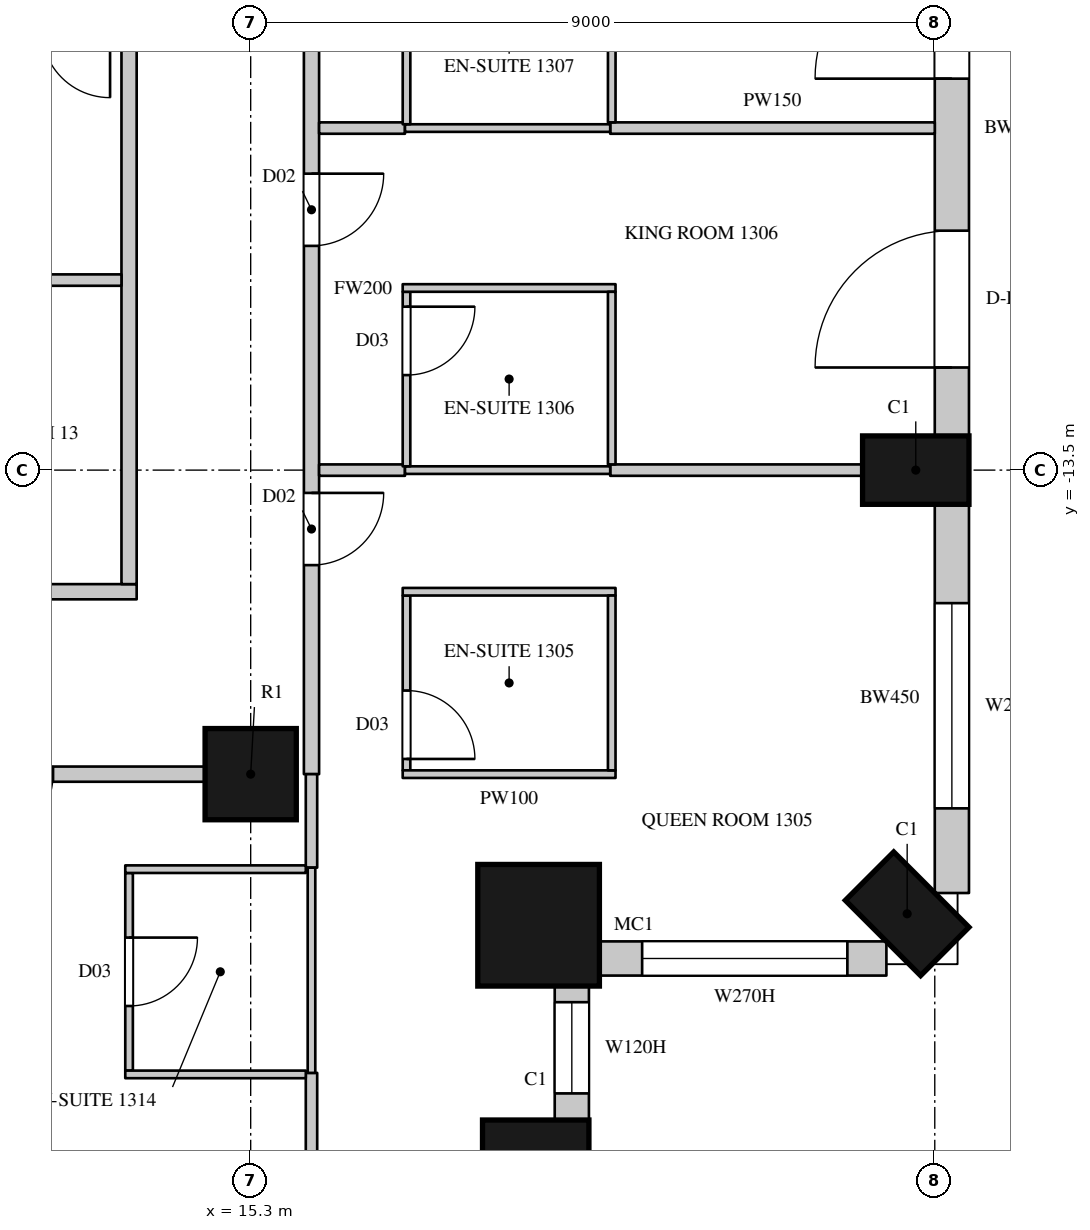
"""IFC4 building model, lengths in metres.
Left out: names, types, materials, properties, quantities, classifications, styles, units other than length and angle.
Written with IfcOpenShell. Run it as: python <this file> out.ifc"""

import sys

from ifc_helpers import new_model, si_unit, direction, frame, frame_2d, origin, origin_2d, place, context, subcontext, project, spatial, rectangle, circle, extrude, element, fill, save


model = new_model("IFC4")
c1 = context("Model", 3, precision=1e-05, world=origin(), true_north=direction((0.0, 1.0)))
c2 = subcontext(c1, "Body", "Model", "MODEL_VIEW")
j1 = project(units=[si_unit("LENGTHUNIT", "METRE"), si_unit("PLANEANGLEUNIT", "RADIAN")], contexts=[c1])
p1 = place(None, origin())
s1 = spatial("IfcSite", under=j1, at=p1, CompositionType="ELEMENT")
p2 = place(p1, origin())
s2 = spatial("IfcBuilding", under=s1, at=p2, CompositionType="ELEMENT")
p3 = place(p2, frame((0.0, 0.0, 77.1)))
s3 = spatial("IfcBuildingStorey", under=s2, at=p3, CompositionType="ELEMENT", Elevation=77.1)
p4 = place(p3, frame((19.05, -22.5, 0.0), z_axis=(0.0, 0.0, 1.0), x_axis=(0.0, 1.0, 0.0)))
e1 = element("IfcColumn", 1, at=p4, inside=s3, PredefinedType="COLUMN", context=c2, shape_type="SweptSolid", body=[
    extrude(rectangle(XDim=0.9, YDim=1.4, at=origin_2d()), origin(), (0.0, 0.0, 1.0), 3.6),
])
p5 = place(p3, frame((19.088, -19.488, 0.0), z_axis=(0.0, 0.0, 1.0), x_axis=(1.0, 0.0, 0.0)))
e2 = element("IfcColumn", 2, at=p5, inside=s3, PredefinedType="COLUMN", context=c2, shape_type="SweptSolid", body=[
    extrude(circle(Radius=0.8, at=origin_2d()), origin(), (0.0, 0.0, 1.0), 3.6),
])
for number, where, z_axis, x_axis in (
    (3, (23.937, -19.337, 0.0), (0.0, 0.0, 1.0), (0.707, 0.707, 0.0)),
    (4, (24.05, -13.5, 0.0), (0.0, 0.0, 1.0), (0.0, 1.0, 0.0)),
):
    element("IfcColumn", number, at=place(p3, frame(where, z_axis=z_axis, x_axis=x_axis)), inside=s3, PredefinedType="COLUMN", context=c2, shape_type="SweptSolid", body=[
        extrude(rectangle(XDim=0.9, YDim=1.4, at=origin_2d()), origin(), (0.0, 0.0, 1.0), 3.6),
    ])
p6 = place(p3, frame((15.3, -17.5, 0.0), z_axis=(0.0, 0.0, 1.0), x_axis=(1.0, 0.0, 0.0)))
e5 = element("IfcColumn", 5, at=p6, inside=s3, PredefinedType="COLUMN", context=c2, shape_type="SweptSolid", body=[
    extrude(circle(Radius=0.6, at=origin_2d()), origin(), (0.0, 0.0, 1.0), 3.6),
])
p7 = place(p3, frame((19.525, -22.05, 0.0), z_axis=(0.0, 0.0, 1.0), x_axis=(0.0, 1.0, 0.0)))
e6 = element("IfcWall", 6, at=p7, inside=s3, PredefinedType="SOLIDWALL", context=c2, shape_type="SweptSolid", body=[
    extrude(rectangle(XDim=1.792, YDim=0.45, at=frame_2d((0.896, 0.0))), origin(), (0.0, 0.0, 1.0), 3.3),
])
p8 = place(p7, frame((0.35, 0.0, 1.05)))
e7 = element("IfcOpeningElement", 7, at=p8, cuts=e6, PredefinedType="OPENING", context=c2, shape_type="SweptSolid", body=[
    extrude(rectangle(XDim=1.2, YDim=2.0, at=frame_2d((0.6, 1.0))), frame((0.0, 0.235, 0.0), z_axis=(0.0, -1.0, 0.0), x_axis=(1.0, 0.0, 0.0)), (0.0, 0.0, 1.0), 0.47),
])
p9 = place(p3, frame((19.858, -19.925, 0.0), z_axis=(0.0, 0.0, 1.0), x_axis=(1.0, 0.0, 0.0)))
e8 = element("IfcWall", 8, at=p9, inside=s3, PredefinedType="SOLIDWALL", context=c2, shape_type="SweptSolid", body=[
    extrude(rectangle(XDim=3.805, YDim=0.45, at=frame_2d((1.903, 0.0))), origin(), (0.0, 0.0, 1.0), 3.3),
])
p10 = place(p9, frame((0.592, 0.0, 1.05)))
e9 = element("IfcOpeningElement", 9, at=p10, cuts=e8, PredefinedType="OPENING", context=c2, shape_type="SweptSolid", body=[
    extrude(rectangle(XDim=2.7, YDim=2.0, at=frame_2d((1.35, 1.0))), frame((0.0, 0.235, 0.0), z_axis=(0.0, -1.0, 0.0), x_axis=(1.0, 0.0, 0.0)), (0.0, 0.0, 1.0), 0.47),
])
p11 = place(p3, frame((24.525, -19.064, 0.0), z_axis=(0.0, 0.0, 1.0), x_axis=(0.0, 1.0, 0.0)))
e10 = element("IfcWall", 10, at=p11, inside=s3, PredefinedType="SOLIDWALL", context=c2, shape_type="SweptSolid", body=[
    extrude(rectangle(XDim=5.114, YDim=0.45, at=frame_2d((2.557, 0.0))), origin(), (0.0, 0.0, 1.0), 3.3),
])
p12 = place(p11, frame((1.114, 0.0, 1.05)))
e11 = element("IfcOpeningElement", 11, at=p12, cuts=e10, PredefinedType="OPENING", context=c2, shape_type="SweptSolid", body=[
    extrude(rectangle(XDim=2.7, YDim=2.0, at=frame_2d((1.35, 1.0))), frame((0.0, 0.235, 0.0), z_axis=(0.0, -1.0, 0.0), x_axis=(1.0, 0.0, 0.0)), (0.0, 0.0, 1.0), 0.47),
])
p13 = place(p3, frame((24.525, -13.05, 0.0), z_axis=(0.0, 0.0, 1.0), x_axis=(0.0, 1.0, 0.0)))
e12 = element("IfcWall", 12, at=p13, inside=s3, PredefinedType="SOLIDWALL", context=c2, shape_type="SweptSolid", body=[
    extrude(rectangle(XDim=8.1, YDim=0.45, at=frame_2d((4.05, 0.0))), origin(), (0.0, 0.0, 1.0), 3.3),
])
p14 = place(p13, frame((0.9, 0.0, 0.0)))
e13 = element("IfcOpeningElement", 13, at=p14, cuts=e12, PredefinedType="OPENING", context=c2, shape_type="SweptSolid", body=[
    extrude(rectangle(XDim=1.8, YDim=2.4, at=frame_2d((0.9, 1.2))), frame((0.0, 0.235, 0.0), z_axis=(0.0, -1.0, 0.0), x_axis=(1.0, 0.0, 0.0)), (0.0, 0.0, 1.0), 0.47),
])
p15 = place(p13, frame((4.7, 0.0, 0.0)))
e14 = element("IfcOpeningElement", 14, at=p15, cuts=e12, PredefinedType="OPENING", context=c2, shape_type="SweptSolid", body=[
    extrude(rectangle(XDim=1.8, YDim=2.4, at=frame_2d((0.9, 1.2))), frame((0.0, 0.235, 0.0), z_axis=(0.0, -1.0, 0.0), x_axis=(1.0, 0.0, 0.0)), (0.0, 0.0, 1.0), 0.47),
])
p16 = place(p13, frame((6.7, 0.0, 1.05)))
e15 = element("IfcOpeningElement", 15, at=p16, cuts=e12, PredefinedType="OPENING", context=c2, shape_type="SweptSolid", body=[
    extrude(rectangle(XDim=1.2, YDim=2.0, at=frame_2d((0.6, 1.0))), frame((0.0, 0.235, 0.0), z_axis=(0.0, -1.0, 0.0), x_axis=(1.0, 0.0, 0.0)), (0.0, 0.0, 1.0), 0.47),
])
p17 = place(p3, frame((6.9, -17.5, 0.0), z_axis=(0.0, 0.0, 1.0), x_axis=(1.0, 0.0, 0.0)))
e16 = element("IfcWall", 16, at=p17, inside=s3, PredefinedType="PARTITIONING", context=c2, shape_type="SweptSolid", body=[
    extrude(rectangle(XDim=7.8, YDim=0.2, at=frame_2d((3.9, 0.0))), origin(), (0.0, 0.0, 1.0), 2.75),
])
p18 = place(p17, frame((4.85, 0.0, 0.0)))
e17 = element("IfcOpeningElement", 17, at=p18, cuts=e16, PredefinedType="OPENING", context=c2, shape_type="SweptSolid", body=[
    extrude(rectangle(XDim=0.95, YDim=2.2, at=frame_2d((0.475, 1.1))), frame((0.0, 0.11, 0.0), z_axis=(0.0, -1.0, 0.0), x_axis=(1.0, 0.0, 0.0)), (0.0, 0.0, 1.0), 0.22),
])
p19 = place(p3, frame((-4.5, -15.1, 0.0), z_axis=(0.0, 0.0, 1.0), x_axis=(1.0, 0.0, 0.0)))
e18 = element("IfcWall", 18, at=p19, inside=s3, PredefinedType="PARTITIONING", context=c2, shape_type="SweptSolid", body=[
    extrude(rectangle(XDim=18.3, YDim=0.2, at=frame_2d((9.15, 0.0))), origin(), (0.0, 0.0, 1.0), 3.3),
])
p20 = place(p19, frame((10.05, 0.0, 0.0)))
e19 = element("IfcOpeningElement", 19, at=p20, cuts=e18, PredefinedType="OPENING", context=c2, shape_type="SweptSolid", body=[
    extrude(rectangle(XDim=0.9, YDim=2.2, at=frame_2d((0.45, 1.1))), frame((0.0, 0.11, 0.0), z_axis=(0.0, -1.0, 0.0), x_axis=(1.0, 0.0, 0.0)), (0.0, 0.0, 1.0), 0.22),
])
p21 = place(p3, frame((13.7, -15.0, 0.0), z_axis=(0.0, 0.0, 1.0), x_axis=(0.0, 1.0, 0.0)))
e20 = element("IfcWall", 20, at=p21, inside=s3, PredefinedType="PARTITIONING", context=c2, shape_type="SweptSolid", body=[
    extrude(rectangle(XDim=7.2, YDim=0.2, at=frame_2d((3.6, 0.0))), origin(), (0.0, 0.0, 1.0), 3.3),
])
p22 = place(p3, frame((16.1, -17.5, 0.0), z_axis=(0.0, 0.0, 1.0), x_axis=(0.0, 1.0, 0.0)))
e21 = element("IfcWall", 21, at=p22, inside=s3, PredefinedType="PARTITIONING", context=c2, shape_type="SweptSolid", body=[
    extrude(rectangle(XDim=12.75, YDim=0.2, at=frame_2d((6.375, 0.0))), origin(), (0.0, 0.0, 1.0), 3.3),
])
p23 = place(p22, frame((2.75, 0.0, 0.0)))
e22 = element("IfcOpeningElement", 22, at=p23, cuts=e21, PredefinedType="OPENING", context=c2, shape_type="SweptSolid", body=[
    extrude(rectangle(XDim=0.95, YDim=2.2, at=frame_2d((0.475, 1.1))), frame((0.0, 0.11, 0.0), z_axis=(0.0, -1.0, 0.0), x_axis=(1.0, 0.0, 0.0)), (0.0, 0.0, 1.0), 0.22),
])
p24 = place(p22, frame((6.95, 0.0, 0.0)))
e23 = element("IfcOpeningElement", 23, at=p24, cuts=e21, PredefinedType="OPENING", context=c2, shape_type="SweptSolid", body=[
    extrude(rectangle(XDim=0.95, YDim=2.2, at=frame_2d((0.475, 1.1))), frame((0.0, 0.11, 0.0), z_axis=(0.0, -1.0, 0.0), x_axis=(1.0, 0.0, 0.0)), (0.0, 0.0, 1.0), 0.22),
])
p25 = place(p22, frame((11.4, 0.0, 0.0)))
e24 = element("IfcOpeningElement", 24, at=p25, cuts=e21, PredefinedType="OPENING", context=c2, shape_type="SweptSolid", body=[
    extrude(rectangle(XDim=0.95, YDim=2.2, at=frame_2d((0.475, 1.1))), frame((0.0, 0.11, 0.0), z_axis=(0.0, -1.0, 0.0), x_axis=(1.0, 0.0, 0.0)), (0.0, 0.0, 1.0), 0.22),
])
p26 = place(p3, frame((10.0, -11.0, 0.0), z_axis=(0.0, 0.0, 1.0), x_axis=(1.0, 0.0, 0.0)))
e25 = element("IfcWall", 25, at=p26, inside=s3, PredefinedType="PARTITIONING", context=c2, shape_type="SweptSolid", body=[
    extrude(rectangle(XDim=3.6, YDim=0.15, at=frame_2d((1.8, 0.0))), origin(), (0.0, 0.0, 1.0), 3.3),
])
p27 = place(p3, frame((16.1, -25.7, 0.0), z_axis=(0.0, 0.0, 1.0), x_axis=(0.0, 1.0, 0.0)))
e26 = element("IfcWall", 26, at=p27, inside=s3, PredefinedType="PARTITIONING", context=c2, shape_type="SweptSolid", body=[
    extrude(rectangle(XDim=4.27, YDim=0.15, at=frame_2d((2.135, 0.0))), origin(), (0.0, 0.0, 1.0), 3.3),
])
p28 = place(p3, frame((16.1, -18.73, 0.0), z_axis=(0.0, 0.0, 1.0), x_axis=(0.0, 1.0, 0.0)))
e27 = element("IfcWall", 27, at=p28, inside=s3, PredefinedType="PARTITIONING", context=c2, shape_type="SweptSolid", body=[
    extrude(rectangle(XDim=1.23, YDim=0.15, at=frame_2d((0.615, 0.0))), origin(), (0.0, 0.0, 1.0), 3.3),
])
p29 = place(p3, frame((16.2, -13.5, 0.0), z_axis=(0.0, 0.0, 1.0), x_axis=(1.0, 0.0, 0.0)))
e28 = element("IfcWall", 28, at=p29, inside=s3, PredefinedType="PARTITIONING", context=c2, shape_type="SweptSolid", body=[
    extrude(rectangle(XDim=1.13, YDim=0.15, at=frame_2d((0.565, 0.0))), origin(), (0.0, 0.0, 1.0), 3.3),
])
p30 = place(p3, frame((16.2, -9.0, 0.0), z_axis=(0.0, 0.0, 1.0), x_axis=(1.0, 0.0, 0.0)))
e29 = element("IfcWall", 29, at=p30, inside=s3, PredefinedType="PARTITIONING", context=c2, shape_type="SweptSolid", body=[
    extrude(rectangle(XDim=1.13, YDim=0.15, at=frame_2d((0.565, 0.0))), origin(), (0.0, 0.0, 1.0), 2.65),
])
p31 = place(p3, frame((20.03, -13.5, 0.0), z_axis=(0.0, 0.0, 1.0), x_axis=(1.0, 0.0, 0.0)))
e30 = element("IfcWall", 30, at=p31, inside=s3, PredefinedType="PARTITIONING", context=c2, shape_type="SweptSolid", body=[
    extrude(rectangle(XDim=3.32, YDim=0.15, at=frame_2d((1.66, 0.0))), origin(), (0.0, 0.0, 1.0), 3.3),
])
p32 = place(p3, frame((20.03, -9.0, 0.0), z_axis=(0.0, 0.0, 1.0), x_axis=(1.0, 0.0, 0.0)))
e31 = element("IfcWall", 31, at=p32, inside=s3, PredefinedType="PARTITIONING", context=c2, shape_type="SweptSolid", body=[
    extrude(rectangle(XDim=4.27, YDim=0.15, at=frame_2d((2.135, 0.0))), origin(), (0.0, 0.0, 1.0), 2.65),
])
p33 = place(p3, frame((13.7, -21.4, 0.0), z_axis=(0.0, 0.0, 1.0), x_axis=(0.0, 1.0, 0.0)))
e32 = element("IfcWall", 32, at=p33, inside=s3, PredefinedType="PARTITIONING", context=c2, shape_type="SweptSolid", body=[
    extrude(rectangle(XDim=2.6, YDim=0.1, at=frame_2d((1.3, 0.0))), origin(), (0.0, 0.0, 1.0), 3.3),
])
p34 = place(p33, frame((0.85, 0.0, 0.0)))
e33 = element("IfcOpeningElement", 33, at=p34, cuts=e32, PredefinedType="OPENING", context=c2, shape_type="SweptSolid", body=[
    extrude(rectangle(XDim=0.9, YDim=2.2, at=frame_2d((0.45, 1.1))), frame((0.0, 0.06, 0.0), z_axis=(0.0, -1.0, 0.0), x_axis=(1.0, 0.0, 0.0)), (0.0, 0.0, 1.0), 0.12),
])
for number, where, z_axis, x_axis in (
    (34, (13.65, -21.45, 0.0), (0.0, 0.0, 1.0), (1.0, 0.0, 0.0)),
    (35, (13.65, -18.75, 0.0), (0.0, 0.0, 1.0), (1.0, 0.0, 0.0)),
):
    element("IfcWall", number, at=place(p3, frame(where, z_axis=z_axis, x_axis=x_axis)), inside=s3, PredefinedType="PARTITIONING", context=c2, shape_type="SweptSolid", body=[
        extrude(rectangle(XDim=2.375, YDim=0.1, at=frame_2d((1.188, 0.0))), origin(), (0.0, 0.0, 1.0), 3.3),
    ])
for number, where, z_axis, x_axis in (
    (36, (16.1, -21.43, 0.0), (0.0, 0.0, 1.0), (0.0, 1.0, 0.0)),
    (37, (17.33, -13.5, 0.0), (0.0, 0.0, 1.0), (1.0, 0.0, 0.0)),
):
    element("IfcWall", number, at=place(p3, frame(where, z_axis=z_axis, x_axis=x_axis)), inside=s3, PredefinedType="PARTITIONING", context=c2, shape_type="SweptSolid", body=[
        extrude(rectangle(XDim=2.7, YDim=0.1, at=frame_2d((1.35, 0.0))), origin(), (0.0, 0.0, 1.0), 3.3),
    ])
p35 = place(p3, frame((17.33, -9.0, 0.0), z_axis=(0.0, 0.0, 1.0), x_axis=(1.0, 0.0, 0.0)))
e38 = element("IfcWall", 38, at=p35, inside=s3, PredefinedType="PARTITIONING", context=c2, shape_type="SweptSolid", body=[
    extrude(rectangle(XDim=2.7, YDim=0.1, at=frame_2d((1.35, 0.0))), origin(), (0.0, 0.0, 1.0), 2.65),
])
p36 = place(p3, frame((17.35, -17.45, 0.0), z_axis=(0.0, 0.0, 1.0), x_axis=(0.0, 1.0, 0.0)))
e39 = element("IfcWall", 39, at=p36, inside=s3, PredefinedType="PARTITIONING", context=c2, shape_type="SweptSolid", body=[
    extrude(rectangle(XDim=2.3, YDim=0.1, at=frame_2d((1.15, 0.0))), origin(), (0.0, 0.0, 1.0), 3.3),
])
p37 = place(p36, frame((0.15, 0.0, 0.0)))
e40 = element("IfcOpeningElement", 40, at=p37, cuts=e39, PredefinedType="OPENING", context=c2, shape_type="SweptSolid", body=[
    extrude(rectangle(XDim=0.9, YDim=2.2, at=frame_2d((0.45, 1.1))), frame((0.0, 0.06, 0.0), z_axis=(0.0, -1.0, 0.0), x_axis=(1.0, 0.0, 0.0)), (0.0, 0.0, 1.0), 0.12),
])
for number, where, z_axis, x_axis in (
    (41, (17.3, -17.5, 0.0), (0.0, 0.0, 1.0), (1.0, 0.0, 0.0)),
    (42, (17.3, -15.1, 0.0), (0.0, 0.0, 1.0), (1.0, 0.0, 0.0)),
):
    element("IfcWall", number, at=place(p3, frame(where, z_axis=z_axis, x_axis=x_axis)), inside=s3, PredefinedType="PARTITIONING", context=c2, shape_type="SweptSolid", body=[
        extrude(rectangle(XDim=2.8, YDim=0.1, at=frame_2d((1.4, 0.0))), origin(), (0.0, 0.0, 1.0), 3.3),
    ])
p38 = place(p3, frame((17.35, -13.45, 0.0), z_axis=(0.0, 0.0, 1.0), x_axis=(0.0, 1.0, 0.0)))
e43 = element("IfcWall", 43, at=p38, inside=s3, PredefinedType="PARTITIONING", context=c2, shape_type="SweptSolid", body=[
    extrude(rectangle(XDim=2.296, YDim=0.1, at=frame_2d((1.148, 0.0))), origin(), (0.0, 0.0, 1.0), 3.3),
])
p39 = place(p38, frame((1.2, 0.0, 0.0)))
e44 = element("IfcOpeningElement", 44, at=p39, cuts=e43, PredefinedType="OPENING", context=c2, shape_type="SweptSolid", body=[
    extrude(rectangle(XDim=0.9, YDim=2.2, at=frame_2d((0.45, 1.1))), frame((0.0, 0.06, 0.0), z_axis=(0.0, -1.0, 0.0), x_axis=(1.0, 0.0, 0.0)), (0.0, 0.0, 1.0), 0.12),
])
p40 = place(p3, frame((17.3, -11.104, 0.0), z_axis=(0.0, 0.0, 1.0), x_axis=(1.0, 0.0, 0.0)))
e45 = element("IfcWall", 45, at=p40, inside=s3, PredefinedType="PARTITIONING", context=c2, shape_type="SweptSolid", body=[
    extrude(rectangle(XDim=2.8, YDim=0.1, at=frame_2d((1.4, 0.0))), origin(), (0.0, 0.0, 1.0), 3.3),
])
p41 = place(p3, frame((17.35, -8.95, 0.0), z_axis=(0.0, 0.0, 1.0), x_axis=(0.000407580973, 0.999999916939, 0.0)))
e46 = element("IfcWall", 46, at=p41, inside=s3, PredefinedType="PARTITIONING", context=c2, shape_type="SweptSolid", body=[
    extrude(rectangle(XDim=2.396, YDim=0.1, at=frame_2d((1.198, 0.0))), origin(), (0.0, 0.0, 1.0), 3.3),
])
p42 = place(p41, frame((1.25, 0.0, 0.0)))
e47 = element("IfcOpeningElement", 47, at=p42, cuts=e46, PredefinedType="OPENING", context=c2, shape_type="SweptSolid", body=[
    extrude(rectangle(XDim=0.9, YDim=2.2, at=frame_2d((0.45, 1.1))), frame((0.0, 0.06, 0.0), z_axis=(0.0, -1.0, 0.0), x_axis=(1.0, 0.0, 0.0)), (0.0, 0.0, 1.0), 0.12),
])
p43 = place(p3, frame((20.05, -17.45, 0.0), z_axis=(0.0, 0.0, 1.0), x_axis=(0.0, 1.0, 0.0)))
e48 = element("IfcWall", 48, at=p43, inside=s3, PredefinedType="PARTITIONING", context=c2, shape_type="SweptSolid", body=[
    extrude(rectangle(XDim=2.3, YDim=0.1, at=frame_2d((1.15, 0.0))), origin(), (0.0, 0.0, 1.0), 3.3),
])
p44 = place(p3, frame((20.05, -13.425, 0.0), z_axis=(0.0, 0.0, 1.0), x_axis=(0.0, 1.0, 0.0)))
e49 = element("IfcWall", 49, at=p44, inside=s3, PredefinedType="PARTITIONING", context=c2, shape_type="SweptSolid", body=[
    extrude(rectangle(XDim=2.271, YDim=0.1, at=frame_2d((1.135, 0.0))), origin(), (0.0, 0.0, 1.0), 3.3),
])
p45 = place(p3, frame((20.05, -8.925, 0.0), z_axis=(0.0, 0.0, 1.0), x_axis=(0.000430200003, 0.999999907464, 0.0)))
e50 = element("IfcWall", 50, at=p45, inside=s3, PredefinedType="PARTITIONING", context=c2, shape_type="SweptSolid", body=[
    extrude(rectangle(XDim=2.27, YDim=0.1, at=frame_2d((1.135, 0.0))), origin(), (0.0, 0.0, 1.0), 3.3),
])
p46 = place(p8, origin())
e51 = element("IfcWindow", 51, at=p46, inside=s3, PartitioningType="SINGLE_PANEL", PredefinedType="WINDOW", context=c2, shape_type="SweptSolid", body=[
    extrude(rectangle(XDim=1.2, YDim=2.0, at=frame_2d((0.6, 1.0))), frame((0.0, 0.135, 0.0), z_axis=(0.0, -1.0, 0.0), x_axis=(1.0, 0.0, 0.0)), (0.0, 0.0, 1.0), 0.06),
])
fill(e7, e51)
p47 = place(p10, origin())
e52 = element("IfcWindow", 52, at=p47, inside=s3, PartitioningType="SINGLE_PANEL", PredefinedType="WINDOW", context=c2, shape_type="SweptSolid", body=[
    extrude(rectangle(XDim=2.7, YDim=2.0, at=frame_2d((1.35, 1.0))), frame((0.0, 0.135, 0.0), z_axis=(0.0, -1.0, 0.0), x_axis=(1.0, 0.0, 0.0)), (0.0, 0.0, 1.0), 0.06),
])
fill(e9, e52)
p48 = place(p12, origin())
e53 = element("IfcWindow", 53, at=p48, inside=s3, PartitioningType="SINGLE_PANEL", PredefinedType="WINDOW", context=c2, shape_type="SweptSolid", body=[
    extrude(rectangle(XDim=2.7, YDim=2.0, at=frame_2d((1.35, 1.0))), frame((0.0, 0.135, 0.0), z_axis=(0.0, -1.0, 0.0), x_axis=(1.0, 0.0, 0.0)), (0.0, 0.0, 1.0), 0.06),
])
fill(e11, e53)
p49 = place(p14, origin())
e54 = element("IfcDoor", 54, at=p49, inside=s3, OperationType="SLIDING_TO_LEFT", PredefinedType="DOOR", context=c2, shape_type="SweptSolid", body=[
    extrude(rectangle(XDim=1.8, YDim=2.4, at=frame_2d((0.9, 1.2))), frame((0.0, 0.13, 0.0), z_axis=(0.0, -1.0, 0.0), x_axis=(1.0, 0.0, 0.0)), (0.0, 0.0, 1.0), 0.05),
])
fill(e13, e54)
p50 = place(p15, origin())
e55 = element("IfcDoor", 55, at=p50, inside=s3, OperationType="SLIDING_TO_LEFT", PredefinedType="DOOR", context=c2, shape_type="SweptSolid", body=[
    extrude(rectangle(XDim=1.8, YDim=2.4, at=frame_2d((0.9, 1.2))), frame((0.0, 0.13, 0.0), z_axis=(0.0, -1.0, 0.0), x_axis=(1.0, 0.0, 0.0)), (0.0, 0.0, 1.0), 0.05),
])
fill(e14, e55)
p51 = place(p23, origin())
e56 = element("IfcDoor", 56, at=p51, inside=s3, OperationType="SINGLE_SWING_LEFT", PredefinedType="DOOR", context=c2, shape_type="SweptSolid", body=[
    extrude(rectangle(XDim=0.95, YDim=2.2, at=frame_2d((0.475, 1.1))), frame((0.0, 0.025, 0.0), z_axis=(0.0, -1.0, 0.0), x_axis=(1.0, 0.0, 0.0)), (0.0, 0.0, 1.0), 0.05),
])
fill(e22, e56)
p52 = place(p37, origin())
e57 = element("IfcDoor", 57, at=p52, inside=s3, OperationType="SINGLE_SWING_RIGHT", PredefinedType="DOOR", context=c2, shape_type="SweptSolid", body=[
    extrude(rectangle(XDim=0.9, YDim=2.2, at=frame_2d((0.45, 1.1))), frame((0.0, 0.025, 0.0), z_axis=(0.0, -1.0, 0.0), x_axis=(1.0, 0.0, 0.0)), (0.0, 0.0, 1.0), 0.05),
])
fill(e40, e57)
p53 = place(p24, origin())
e58 = element("IfcDoor", 58, at=p53, inside=s3, OperationType="SINGLE_SWING_LEFT", PredefinedType="DOOR", context=c2, shape_type="SweptSolid", body=[
    extrude(rectangle(XDim=0.95, YDim=2.2, at=frame_2d((0.475, 1.1))), frame((0.0, 0.025, 0.0), z_axis=(0.0, -1.0, 0.0), x_axis=(1.0, 0.0, 0.0)), (0.0, 0.0, 1.0), 0.05),
])
fill(e23, e58)
p54 = place(p39, origin())
e59 = element("IfcDoor", 59, at=p54, inside=s3, OperationType="SINGLE_SWING_LEFT", PredefinedType="DOOR", context=c2, shape_type="SweptSolid", body=[
    extrude(rectangle(XDim=0.9, YDim=2.2, at=frame_2d((0.45, 1.1))), frame((0.0, 0.025, 0.0), z_axis=(0.0, -1.0, 0.0), x_axis=(1.0, 0.0, 0.0)), (0.0, 0.0, 1.0), 0.05),
])
fill(e44, e59)
p55 = place(p18, origin())
e60 = element("IfcDoor", 60, at=p55, inside=s3, OperationType="SINGLE_SWING_RIGHT", PredefinedType="DOOR", context=c2, shape_type="SweptSolid", body=[
    extrude(rectangle(XDim=0.95, YDim=2.2, at=frame_2d((0.475, 1.1))), frame((0.0, 0.025, 0.0), z_axis=(0.0, -1.0, 0.0), x_axis=(1.0, 0.0, 0.0)), (0.0, 0.0, 1.0), 0.05),
])
fill(e17, e60)
p56 = place(p34, origin())
e61 = element("IfcDoor", 61, at=p56, inside=s3, OperationType="SINGLE_SWING_LEFT", PredefinedType="DOOR", context=c2, shape_type="SweptSolid", body=[
    extrude(rectangle(XDim=0.9, YDim=2.2, at=frame_2d((0.45, 1.1))), frame((0.0, 0.025, 0.0), z_axis=(0.0, -1.0, 0.0), x_axis=(1.0, 0.0, 0.0)), (0.0, 0.0, 1.0), 0.05),
])
fill(e33, e61)
save(model, sys.argv[1])
